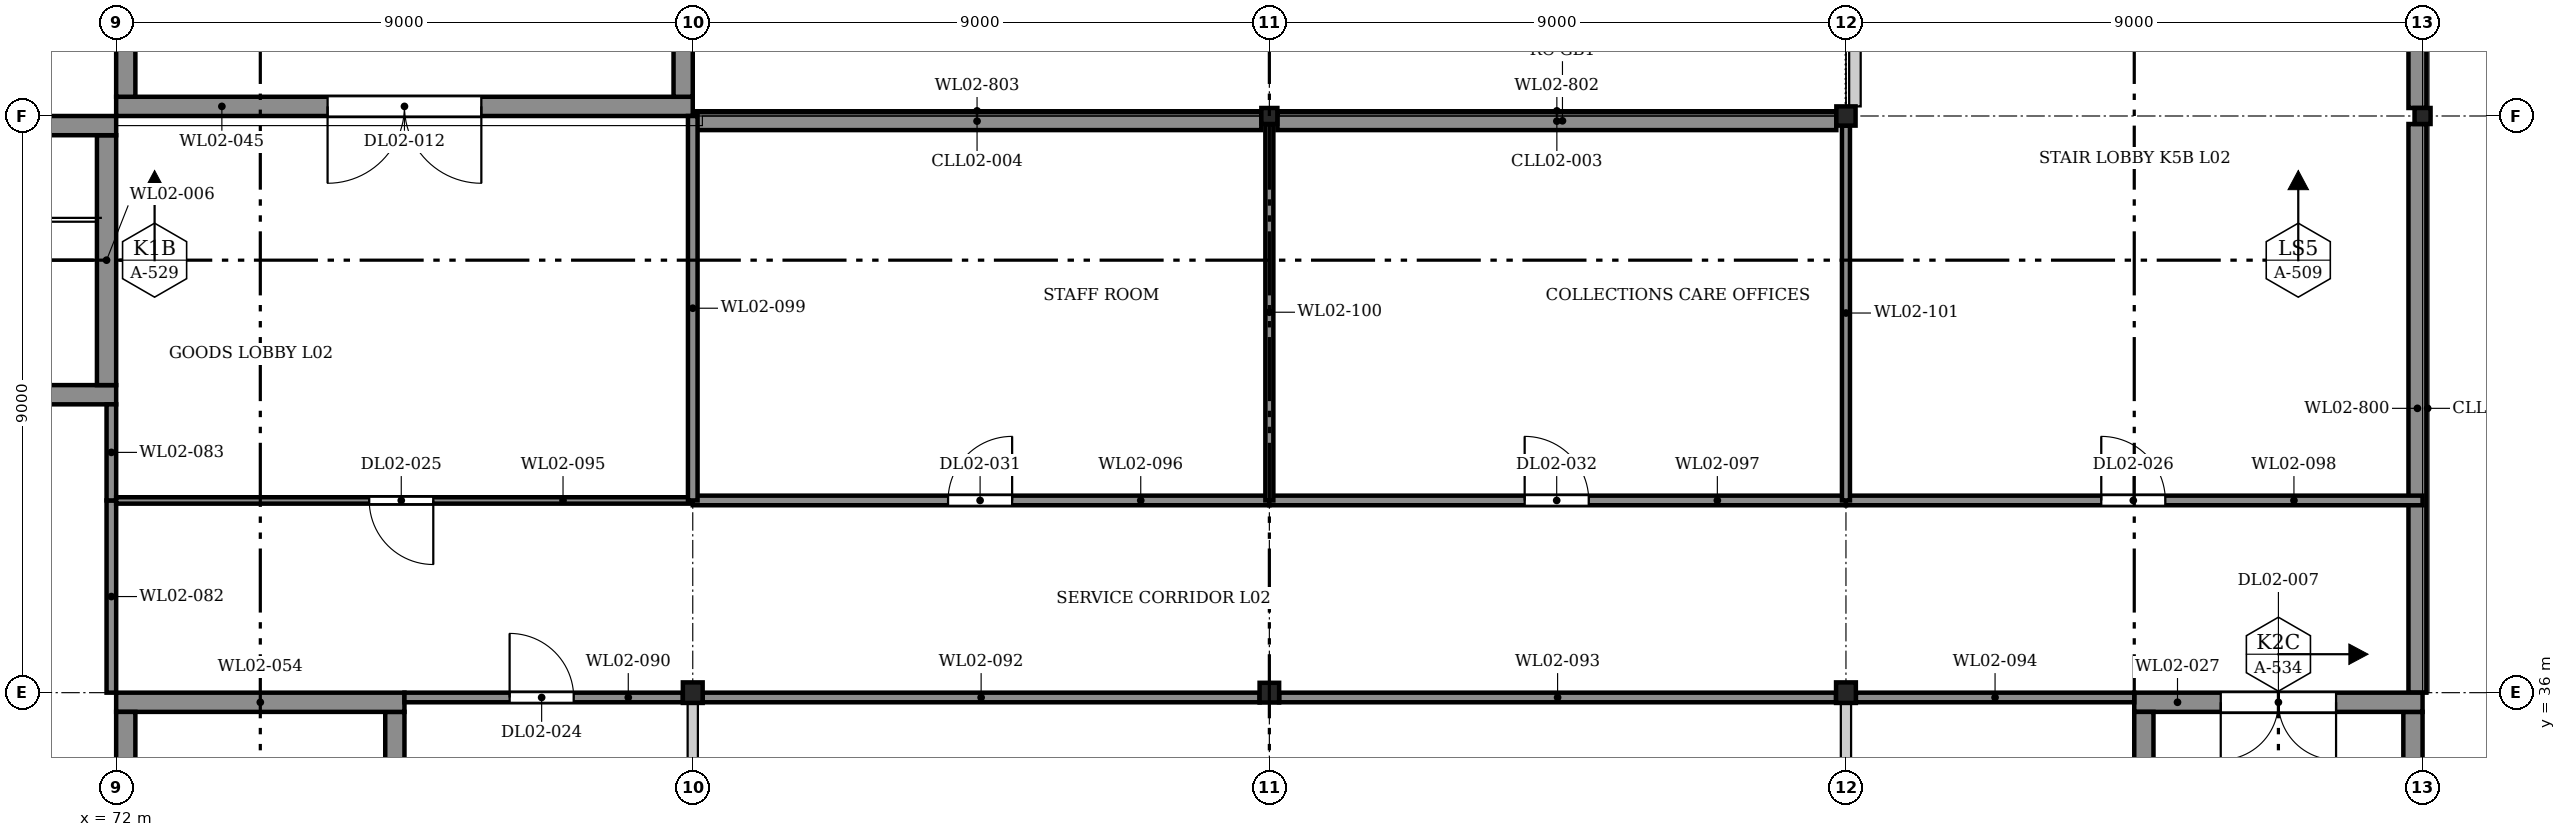
"""IFC4 building model, lengths in metres.
Left out: names, types, materials, properties, quantities, classifications, styles, units other than length and angle.
Written with IfcOpenShell. Run it as: python <this file> out.ifc"""

import sys

from ifc_helpers import new_model, si_unit, direction, frame, frame_2d, origin, origin_2d, place, context, subcontext, project, spatial, rectangle, hollow_rectangle, i_section, extrude, element, fill, save


model = new_model("IFC4")
c1 = context("Model", 3, precision=1e-05, world=origin(), true_north=direction((0.0, 1.0)))
c2 = subcontext(c1, "Body", "Model", "MODEL_VIEW")
j1 = project(units=[si_unit("LENGTHUNIT", "METRE"), si_unit("PLANEANGLEUNIT", "RADIAN")], contexts=[c1])
p1 = place(None, origin())
s1 = spatial("IfcSite", under=j1, at=p1, CompositionType="ELEMENT")
p2 = place(p1, origin())
s2 = spatial("IfcBuilding", under=s1, at=p2, CompositionType="ELEMENT")
p3 = place(p2, frame((0.0, 0.0, 9.2)))
s3 = spatial("IfcBuildingStorey", under=s2, at=p3, CompositionType="ELEMENT", Elevation=9.2)
p4 = place(p3, frame((81.0, 36.0, 0.0), z_axis=(0.0, 0.0, 1.0), x_axis=(1.0, 0.0, 0.0)))
e1 = element("IfcColumn", 1, at=p4, inside=s3, PredefinedType="COLUMN", context=c2, shape_type="SweptSolid", body=[
    extrude(i_section(OverallWidth=0.309, OverallDepth=0.321, WebThickness=0.014, FlangeThickness=0.022, FilletRadius=0.017, at=origin_2d()), origin(), (0.0, 0.0, 1.0), 4.2),
])
p5 = place(p3, frame((90.0, 36.0, 0.0), z_axis=(0.0, 0.0, 1.0), x_axis=(1.0, 0.0, 0.0)))
e2 = element("IfcColumn", 2, at=p5, inside=s3, PredefinedType="COLUMN", context=c2, shape_type="SweptSolid", body=[
    extrude(i_section(OverallWidth=0.305, OverallDepth=0.308, WebThickness=0.01, FlangeThickness=0.015, FilletRadius=0.017, at=origin_2d()), origin(), (0.0, 0.0, 1.0), 4.2),
])
p6 = place(p3, frame((99.0, 36.0, 0.0), z_axis=(0.0, 0.0, 1.0), x_axis=(1.0, 0.0, 0.0)))
e3 = element("IfcColumn", 3, at=p6, inside=s3, PredefinedType="COLUMN", context=c2, shape_type="SweptSolid", body=[
    extrude(i_section(OverallWidth=0.309, OverallDepth=0.321, WebThickness=0.014, FlangeThickness=0.022, FilletRadius=0.017, at=origin_2d()), origin(), (0.0, 0.0, 1.0), 4.2),
])
p7 = place(p3, frame((90.0, 45.0, 0.0), z_axis=(0.0, 0.0, 1.0), x_axis=(1.0, 0.0, 0.0)))
e4 = element("IfcColumn", 4, at=p7, inside=s3, PredefinedType="COLUMN", context=c2, shape_type="SweptSolid", body=[
    extrude(hollow_rectangle(XDim=0.25, YDim=0.25, WallThickness=0.01, InnerFilletRadius=0.015, OuterFilletRadius=0.025, at=origin_2d()), origin(), (0.0, 0.0, 1.0), 3.7),
])
p8 = place(p3, frame((99.0, 45.0, 0.0), z_axis=(0.0, 0.0, 1.0), x_axis=(1.0, 0.0, 0.0)))
e5 = element("IfcColumn", 5, at=p8, inside=s3, PredefinedType="COLUMN", context=c2, shape_type="SweptSolid", body=[
    extrude(hollow_rectangle(XDim=0.3, YDim=0.3, WallThickness=0.01, InnerFilletRadius=0.015, OuterFilletRadius=0.025, at=origin_2d()), origin(), (0.0, 0.0, 1.0), 3.7),
])
p9 = place(p3, frame((108.0, 45.0, 0.0), z_axis=(0.0, 0.0, 1.0), x_axis=(1.0, 0.0, 0.0)))
e6 = element("IfcColumn", 6, at=p9, inside=s3, PredefinedType="COLUMN", context=c2, shape_type="SweptSolid", body=[
    extrude(hollow_rectangle(XDim=0.25, YDim=0.25, WallThickness=0.01, InnerFilletRadius=0.015, OuterFilletRadius=0.025, at=origin_2d()), origin(), (0.0, 0.0, 1.0), 3.7),
])
for number, where, z_axis, x_axis in (
    (7, (107.92, 36.0, 0.0), (0.0, 0.0, 1.0), (0.0, 1.0, 0.0)),
    (8, (107.92, 45.125, 0.0), (0.0, 0.0, 1.0), (0.0, 1.0, 0.0)),
):
    element("IfcWall", number, at=place(p3, frame(where, z_axis=z_axis, x_axis=x_axis)), inside=s3, PredefinedType="SOLIDWALL", context=c2, shape_type="SweptSolid", body=[
        extrude(rectangle(XDim=8.875, YDim=0.28, at=frame_2d((4.438, 0.0))), origin(), (0.0, 0.0, 1.0), 2.75),
    ])
p10 = place(p3, frame((90.125, 44.92, 0.0), z_axis=(0.0, 0.0, 1.0), x_axis=(1.0, 0.0, 0.0)))
e9 = element("IfcWall", 9, at=p10, inside=s3, PredefinedType="SOLIDWALL", context=c2, shape_type="SweptSolid", body=[
    extrude(rectangle(XDim=8.725, YDim=0.28, at=frame_2d((4.363, 0.0))), origin(), (0.0, 0.0, 1.0), 2.75),
])
p11 = place(p3, frame((81.0, 44.92, 0.0), z_axis=(0.0, 0.0, 1.0), x_axis=(1.0, 0.0, 0.0)))
e10 = element("IfcWall", 10, at=p11, inside=s3, PredefinedType="SOLIDWALL", context=c2, shape_type="SweptSolid", body=[
    extrude(rectangle(XDim=8.875, YDim=0.28, at=frame_2d((4.438, 0.0))), origin(), (0.0, 0.0, 1.0), 2.75),
])
p12 = place(p3, frame((81.3, 44.875, 3.7), z_axis=(0.0, 0.0, 1.0), x_axis=(1.0, 0.0, 0.0)))
e11 = element("IfcWall", 11, at=p12, inside=s3, PredefinedType="PARAPET", context=c2, shape_type="SweptSolid", body=[
    extrude(rectangle(XDim=17.7, YDim=0.25, at=frame_2d((8.85, 0.0))), origin(), (0.0, 0.0, 1.0), 1.6),
])
for number, where, z_axis, x_axis in (
    (12, (99.125, 45.125, 3.7), (0.0, 0.0, 1.0), (0.0, 1.0, 0.0)),
    (13, (107.875, 45.125, 3.7), (0.0, 0.0, 1.0), (0.0, 1.0, 0.0)),
    (14, (107.875, 36.3, 3.7), (0.0, 0.0, 1.0), (0.0, 1.0, 0.0)),
):
    element("IfcWall", number, at=place(p3, frame(where, z_axis=z_axis, x_axis=x_axis)), inside=s3, PredefinedType="PARAPET", context=c2, shape_type="SweptSolid", body=[
        extrude(rectangle(XDim=8.575, YDim=0.25, at=frame_2d((4.288, 0.0))), origin(), (0.0, 0.0, 1.0), 1.6),
    ])
p13 = place(p3, frame((63.0, 40.65, 0.0), z_axis=(0.0, 0.0, 1.0), x_axis=(1.0, 0.0, 0.0)))
e15 = element("IfcWall", 15, at=p13, inside=s3, PredefinedType="SOLIDWALL", context=c2, shape_type="SweptSolid", body=[
    extrude(rectangle(XDim=9.0, YDim=0.3, at=frame_2d((4.5, 0.0))), origin(), (0.0, 0.0, 1.0), 4.2),
])
p14 = place(p3, frame((71.85, 40.8, 0.0), z_axis=(0.0, 0.0, 1.0), x_axis=(0.0, 1.0, 0.0)))
e16 = element("IfcWall", 16, at=p14, inside=s3, PredefinedType="SOLIDWALL", context=c2, shape_type="SweptSolid", body=[
    extrude(rectangle(XDim=3.9, YDim=0.3, at=frame_2d((1.95, 0.0))), origin(), (0.0, 0.0, 1.0), 4.2),
])
p15 = place(p3, frame((63.0, 44.85, 0.0), z_axis=(0.0, 0.0, 1.0), x_axis=(1.0, 0.0, 0.0)))
e17 = element("IfcWall", 17, at=p15, inside=s3, PredefinedType="SOLIDWALL", context=c2, shape_type="SweptSolid", body=[
    extrude(rectangle(XDim=9.0, YDim=0.3, at=frame_2d((4.5, 0.0))), origin(), (0.0, 0.0, 1.0), 4.2),
])
p16 = place(p3, frame((107.85, 27.3, 0.0), z_axis=(0.0, 0.0, 1.0), x_axis=(0.0, 1.0, 0.0)))
e18 = element("IfcWall", 18, at=p16, inside=s3, PredefinedType="SOLIDWALL", context=c2, shape_type="SweptSolid", body=[
    extrude(rectangle(XDim=8.4, YDim=0.3, at=frame_2d((4.2, 0.0))), origin(), (0.0, 0.0, 1.0), 4.2),
])
p17 = place(p3, frame((103.5, 35.85, 0.0), z_axis=(0.0, 0.0, 1.0), x_axis=(1.0, 0.0, 0.0)))
e19 = element("IfcWall", 19, at=p17, inside=s3, PredefinedType="SOLIDWALL", context=c2, shape_type="SweptSolid", body=[
    extrude(rectangle(XDim=4.5, YDim=0.3, at=frame_2d((2.25, 0.0))), origin(), (0.0, 0.0, 1.0), 4.2),
])
p18 = place(p17, frame((1.35, 0.0, 0.0)))
e20 = element("IfcOpeningElement", 20, at=p18, cuts=e19, PredefinedType="OPENING", context=c2, shape_type="SweptSolid", body=[
    extrude(rectangle(XDim=1.8, YDim=2.1, at=frame_2d((0.9, 1.05))), frame((0.0, 0.16, 0.0), z_axis=(0.0, -1.0, 0.0), x_axis=(1.0, 0.0, 0.0)), (0.0, 0.0, 1.0), 0.32),
])
p19 = place(p3, frame((103.65, 27.3, 0.0), z_axis=(0.0, 0.0, 1.0), x_axis=(0.0, 1.0, 0.0)))
e21 = element("IfcWall", 21, at=p19, inside=s3, PredefinedType="SOLIDWALL", context=c2, shape_type="SweptSolid", body=[
    extrude(rectangle(XDim=8.4, YDim=0.3, at=frame_2d((4.2, 0.0))), origin(), (0.0, 0.0, 1.0), 4.2),
])
p20 = place(p3, frame((72.0, 45.15, 0.0), z_axis=(0.0, 0.0, 1.0), x_axis=(1.0, 0.0, 0.0)))
e22 = element("IfcWall", 22, at=p20, inside=s3, PredefinedType="SOLIDWALL", context=c2, shape_type="SweptSolid", body=[
    extrude(rectangle(XDim=9.0, YDim=0.3, at=frame_2d((4.5, 0.0))), origin(), (0.0, 0.0, 1.0), 4.2),
])
p21 = place(p20, frame((3.3, 0.0, 0.0)))
e23 = element("IfcOpeningElement", 23, at=p21, cuts=e22, PredefinedType="OPENING", context=c2, shape_type="SweptSolid", body=[
    extrude(rectangle(XDim=2.4, YDim=2.4, at=frame_2d((1.2, 1.2))), frame((0.0, 0.16, 0.0), z_axis=(0.0, -1.0, 0.0), x_axis=(1.0, 0.0, 0.0)), (0.0, 0.0, 1.0), 0.32),
])
for number, where, z_axis, x_axis in (
    (24, (80.85, 45.3, 0.0), (0.0, 0.0, 1.0), (0.0, 1.0, 0.0)),
    (25, (72.15, 45.3, 0.0), (0.0, 0.0, 1.0), (0.0, 1.0, 0.0)),
):
    element("IfcWall", number, at=place(p3, frame(where, z_axis=z_axis, x_axis=x_axis)), inside=s3, PredefinedType="SOLIDWALL", context=c2, shape_type="SweptSolid", body=[
        extrude(rectangle(XDim=8.4, YDim=0.3, at=frame_2d((4.2, 0.0))), origin(), (0.0, 0.0, 1.0), 4.2),
    ])
p22 = place(p3, frame((76.35, 27.3, 0.0), z_axis=(0.0, 0.0, 1.0), x_axis=(0.0, 1.0, 0.0)))
e26 = element("IfcWall", 26, at=p22, inside=s3, PredefinedType="SOLIDWALL", context=c2, shape_type="SweptSolid", body=[
    extrude(rectangle(XDim=8.4, YDim=0.3, at=frame_2d((4.2, 0.0))), origin(), (0.0, 0.0, 1.0), 4.2),
])
p23 = place(p22, frame((0.45, 0.0, 0.0)))
e27 = element("IfcOpeningElement", 27, at=p23, cuts=e26, PredefinedType="OPENING", context=c2, shape_type="SweptSolid", body=[
    extrude(rectangle(XDim=1.4, YDim=2.1, at=frame_2d((0.7, 1.05))), frame((0.0, 0.16, 0.0), z_axis=(0.0, -1.0, 0.0), x_axis=(1.0, 0.0, 0.0)), (0.0, 0.0, 1.0), 0.32),
])
p24 = place(p22, frame((4.925, 0.0, 0.0)))
e28 = element("IfcOpeningElement", 28, at=p24, cuts=e26, PredefinedType="OPENING", context=c2, shape_type="SweptSolid", body=[
    extrude(rectangle(XDim=1.0, YDim=2.1, at=frame_2d((0.5, 1.05))), frame((0.0, 0.16, 0.0), z_axis=(0.0, -1.0, 0.0), x_axis=(1.0, 0.0, 0.0)), (0.0, 0.0, 1.0), 0.32),
])
p25 = place(p3, frame((72.0, 35.85, 0.0), z_axis=(0.0, 0.0, 1.0), x_axis=(1.0, 0.0, 0.0)))
e29 = element("IfcWall", 29, at=p25, inside=s3, PredefinedType="SOLIDWALL", context=c2, shape_type="SweptSolid", body=[
    extrude(rectangle(XDim=4.5, YDim=0.3, at=frame_2d((2.25, 0.0))), origin(), (0.0, 0.0, 1.0), 4.2),
])
p26 = place(p3, frame((72.15, 27.3, 0.0), z_axis=(0.0, 0.0, 1.0), x_axis=(0.0, 1.0, 0.0)))
e30 = element("IfcWall", 30, at=p26, inside=s3, PredefinedType="SOLIDWALL", context=c2, shape_type="SweptSolid", body=[
    extrude(rectangle(XDim=8.4, YDim=0.3, at=frame_2d((4.2, 0.0))), origin(), (0.0, 0.0, 1.0), 4.2),
])
p27 = place(p26, frame((0.45, 0.0, 0.0)))
e31 = element("IfcOpeningElement", 31, at=p27, cuts=e30, PredefinedType="OPENING", context=c2, shape_type="SweptSolid", body=[
    extrude(rectangle(XDim=1.4, YDim=2.1, at=frame_2d((0.7, 1.05))), frame((0.0, 0.16, 0.0), z_axis=(0.0, -1.0, 0.0), x_axis=(1.0, 0.0, 0.0)), (0.0, 0.0, 1.0), 0.32),
])
p28 = place(p3, frame((71.925, 36.0, 0.0), z_axis=(0.0, 0.0, 1.0), x_axis=(0.0, 1.0, 0.0)))
e32 = element("IfcWall", 32, at=p28, inside=s3, PredefinedType="PARTITIONING", context=c2, shape_type="SweptSolid", body=[
    extrude(rectangle(XDim=3.0, YDim=0.15, at=frame_2d((1.5, 0.0))), origin(), (0.0, 0.0, 1.0), 3.035),
])
p29 = place(p3, frame((71.925, 39.0, 0.0), z_axis=(0.0, 0.0, 1.0), x_axis=(0.0, 1.0, 0.0)))
e33 = element("IfcWall", 33, at=p29, inside=s3, PredefinedType="PARTITIONING", context=c2, shape_type="SweptSolid", body=[
    extrude(rectangle(XDim=1.5, YDim=0.15, at=frame_2d((0.75, 0.0))), origin(), (0.0, 0.0, 1.0), 3.035),
])
p30 = place(p3, frame((76.5, 35.925, 0.0), z_axis=(0.0, 0.0, 1.0), x_axis=(1.0, 0.0, 0.0)))
e34 = element("IfcWall", 34, at=p30, inside=s3, PredefinedType="PARTITIONING", context=c2, shape_type="SweptSolid", body=[
    extrude(rectangle(XDim=4.345, YDim=0.15, at=frame_2d((2.173, 0.0))), origin(), (0.0, 0.0, 1.0), 3.035),
])
p31 = place(p30, frame((1.641, 0.0, 0.0)))
e35 = element("IfcOpeningElement", 35, at=p31, cuts=e34, PredefinedType="OPENING", context=c2, shape_type="SweptSolid", body=[
    extrude(rectangle(XDim=1.0, YDim=2.1, at=frame_2d((0.5, 1.05))), frame((0.0, 0.085, 0.0), z_axis=(0.0, -1.0, 0.0), x_axis=(1.0, 0.0, 0.0)), (0.0, 0.0, 1.0), 0.17),
])
for number, where, z_axis, x_axis in (
    (36, (81.155, 35.925, 0.0), (0.0, 0.0, 1.0), (1.0, 0.0, 0.0)),
    (37, (90.153, 35.925, 0.0), (0.0, 0.0, 1.0), (1.0, 0.0, 0.0)),
):
    element("IfcWall", number, at=place(p3, frame(where, z_axis=z_axis, x_axis=x_axis)), inside=s3, PredefinedType="PARTITIONING", context=c2, shape_type="SweptSolid", body=[
        extrude(rectangle(XDim=8.693, YDim=0.15, at=frame_2d((4.346, 0.0))), origin(), (0.0, 0.0, 1.0), 3.035),
    ])
p32 = place(p3, frame((99.155, 35.925, 0.0), z_axis=(0.0, 0.0, 1.0), x_axis=(1.0, 0.0, 0.0)))
e38 = element("IfcWall", 38, at=p32, inside=s3, PredefinedType="PARTITIONING", context=c2, shape_type="SweptSolid", body=[
    extrude(rectangle(XDim=4.345, YDim=0.15, at=frame_2d((2.173, 0.0))), origin(), (0.0, 0.0, 1.0), 3.035),
])
p33 = place(p3, frame((72.0, 39.0, 0.0), z_axis=(0.0, 0.0, 1.0), x_axis=(1.0, 0.0, 0.0)))
e39 = element("IfcWall", 39, at=p33, inside=s3, PredefinedType="PARTITIONING", context=c2, shape_type="SweptSolid", body=[
    extrude(rectangle(XDim=9.0, YDim=0.1, at=frame_2d((4.5, 0.0))), origin(), (0.0, 0.0, 1.0), 2.658),
])
p34 = place(p33, frame((3.95, 0.0, 0.0)))
e40 = element("IfcOpeningElement", 40, at=p34, cuts=e39, PredefinedType="OPENING", context=c2, shape_type="SweptSolid", body=[
    extrude(rectangle(XDim=1.0, YDim=2.1, at=frame_2d((0.5, 1.05))), frame((0.0, 0.06, 0.0), z_axis=(0.0, -1.0, 0.0), x_axis=(1.0, 0.0, 0.0)), (0.0, 0.0, 1.0), 0.12),
])
p35 = place(p3, frame((81.0, 39.0, 0.0), z_axis=(0.0, 0.0, 1.0), x_axis=(1.0, 0.0, 0.0)))
e41 = element("IfcWall", 41, at=p35, inside=s3, PredefinedType="PARTITIONING", context=c2, shape_type="SweptSolid", body=[
    extrude(rectangle(XDim=9.0, YDim=0.15, at=frame_2d((4.5, 0.0))), origin(), (0.0, 0.0, 1.0), 2.658),
])
p36 = place(p35, frame((3.985, 0.0, 0.0)))
e42 = element("IfcOpeningElement", 42, at=p36, cuts=e41, PredefinedType="OPENING", context=c2, shape_type="SweptSolid", body=[
    extrude(rectangle(XDim=1.0, YDim=2.1, at=frame_2d((0.5, 1.05))), frame((0.0, 0.085, 0.0), z_axis=(0.0, -1.0, 0.0), x_axis=(1.0, 0.0, 0.0)), (0.0, 0.0, 1.0), 0.17),
])
p37 = place(p3, frame((90.0, 39.0, 0.0), z_axis=(0.0, 0.0, 1.0), x_axis=(1.0, 0.0, 0.0)))
e43 = element("IfcWall", 43, at=p37, inside=s3, PredefinedType="PARTITIONING", context=c2, shape_type="SweptSolid", body=[
    extrude(rectangle(XDim=9.0, YDim=0.15, at=frame_2d((4.5, 0.0))), origin(), (0.0, 0.0, 1.0), 2.658),
])
p38 = place(p37, frame((3.985, 0.0, 0.0)))
e44 = element("IfcOpeningElement", 44, at=p38, cuts=e43, PredefinedType="OPENING", context=c2, shape_type="SweptSolid", body=[
    extrude(rectangle(XDim=1.0, YDim=2.1, at=frame_2d((0.5, 1.05))), frame((0.0, 0.085, 0.0), z_axis=(0.0, -1.0, 0.0), x_axis=(1.0, 0.0, 0.0)), (0.0, 0.0, 1.0), 0.17),
])
p39 = place(p3, frame((99.0, 39.0, 0.0), z_axis=(0.0, 0.0, 1.0), x_axis=(1.0, 0.0, 0.0)))
e45 = element("IfcWall", 45, at=p39, inside=s3, PredefinedType="PARTITIONING", context=c2, shape_type="SweptSolid", body=[
    extrude(rectangle(XDim=9.0, YDim=0.15, at=frame_2d((4.5, 0.0))), origin(), (0.0, 0.0, 1.0), 2.658),
])
p40 = place(p39, frame((3.985, 0.0, 0.0)))
e46 = element("IfcOpeningElement", 46, at=p40, cuts=e45, PredefinedType="OPENING", context=c2, shape_type="SweptSolid", body=[
    extrude(rectangle(XDim=1.0, YDim=2.1, at=frame_2d((0.5, 1.05))), frame((0.0, 0.085, 0.0), z_axis=(0.0, -1.0, 0.0), x_axis=(1.0, 0.0, 0.0)), (0.0, 0.0, 1.0), 0.17),
])
p41 = place(p3, frame((81.0, 39.0, 0.0), z_axis=(0.0, 0.0, 1.0), x_axis=(0.0, 1.0, 0.0)))
e47 = element("IfcWall", 47, at=p41, inside=s3, PredefinedType="PARTITIONING", context=c2, shape_type="SweptSolid", body=[
    extrude(rectangle(XDim=6.0, YDim=0.15, at=frame_2d((3.0, 0.0))), origin(), (0.0, 0.0, 1.0), 2.658),
])
p42 = place(p3, frame((90.0, 39.0, 0.0), z_axis=(0.0, 0.0, 1.0), x_axis=(0.0, 1.0, 0.0)))
e48 = element("IfcWall", 48, at=p42, inside=s3, PredefinedType="PARTITIONING", context=c2, shape_type="SweptSolid", body=[
    extrude(rectangle(XDim=5.875, YDim=0.125, at=frame_2d((2.938, 0.0))), origin(), (0.0, 0.0, 1.0), 2.658),
])
p43 = place(p3, frame((99.0, 39.0, 0.0), z_axis=(0.0, 0.0, 1.0), x_axis=(0.0, 1.0, 0.0)))
e49 = element("IfcWall", 49, at=p43, inside=s3, PredefinedType="PARTITIONING", context=c2, shape_type="SweptSolid", body=[
    extrude(rectangle(XDim=5.85, YDim=0.125, at=frame_2d((2.925, 0.0))), origin(), (0.0, 0.0, 1.0), 2.658),
])
p44 = place(p18, frame((1.8, 0.0, 0.0), z_axis=(0.0, 0.0, 1.0), x_axis=(-1.0, 0.0, 0.0)))
e50 = element("IfcDoor", 50, at=p44, inside=s3, OperationType="DOUBLE_DOOR_SINGLE_SWING", PredefinedType="DOOR", context=c2, shape_type="SweptSolid", body=[
    extrude(rectangle(XDim=1.8, YDim=2.1, at=frame_2d((0.9, 1.05))), frame((0.0, 0.025, 0.0), z_axis=(0.0, -1.0, 0.0), x_axis=(1.0, 0.0, 0.0)), (0.0, 0.0, 1.0), 0.05),
])
fill(e20, e50)
p45 = place(p21, frame((2.4, 0.0, 0.0), z_axis=(0.0, 0.0, 1.0), x_axis=(-1.0, 0.0, 0.0)))
e51 = element("IfcDoor", 51, at=p45, inside=s3, OperationType="DOUBLE_DOOR_SINGLE_SWING", PredefinedType="DOOR", context=c2, shape_type="SweptSolid", body=[
    extrude(rectangle(XDim=2.4, YDim=2.4, at=frame_2d((1.2, 1.2))), frame((0.0, 0.025, 0.0), z_axis=(0.0, -1.0, 0.0), x_axis=(1.0, 0.0, 0.0)), (0.0, 0.0, 1.0), 0.05),
])
fill(e23, e51)
p46 = place(p31, origin())
e52 = element("IfcDoor", 52, at=p46, inside=s3, OperationType="SINGLE_SWING_RIGHT", PredefinedType="DOOR", context=c2, shape_type="SweptSolid", body=[
    extrude(rectangle(XDim=1.0, YDim=2.1, at=frame_2d((0.5, 1.05))), frame((0.0, 0.025, 0.0), z_axis=(0.0, -1.0, 0.0), x_axis=(1.0, 0.0, 0.0)), (0.0, 0.0, 1.0), 0.05),
])
fill(e35, e52)
p47 = place(p34, frame((1.0, 0.0, 0.0), z_axis=(0.0, 0.0, 1.0), x_axis=(-1.0, 0.0, 0.0)))
e53 = element("IfcDoor", 53, at=p47, inside=s3, OperationType="SINGLE_SWING_RIGHT", PredefinedType="DOOR", context=c2, shape_type="SweptSolid", body=[
    extrude(rectangle(XDim=1.0, YDim=2.1, at=frame_2d((0.5, 1.05))), frame((0.0, 0.025, 0.0), z_axis=(0.0, -1.0, 0.0), x_axis=(1.0, 0.0, 0.0)), (0.0, 0.0, 1.0), 0.05),
])
fill(e40, e53)
p48 = place(p40, origin())
e54 = element("IfcDoor", 54, at=p48, inside=s3, OperationType="SINGLE_SWING_RIGHT", PredefinedType="DOOR", context=c2, shape_type="SweptSolid", body=[
    extrude(rectangle(XDim=1.0, YDim=2.1, at=frame_2d((0.5, 1.05))), frame((0.0, 0.025, 0.0), z_axis=(0.0, -1.0, 0.0), x_axis=(1.0, 0.0, 0.0)), (0.0, 0.0, 1.0), 0.05),
])
fill(e46, e54)
p49 = place(p36, origin())
e55 = element("IfcDoor", 55, at=p49, inside=s3, OperationType="SINGLE_SWING_LEFT", PredefinedType="DOOR", context=c2, shape_type="SweptSolid", body=[
    extrude(rectangle(XDim=1.0, YDim=2.1, at=frame_2d((0.5, 1.05))), frame((0.0, 0.025, 0.0), z_axis=(0.0, -1.0, 0.0), x_axis=(1.0, 0.0, 0.0)), (0.0, 0.0, 1.0), 0.05),
])
fill(e42, e55)
p50 = place(p38, origin())
e56 = element("IfcDoor", 56, at=p50, inside=s3, OperationType="SINGLE_SWING_RIGHT", PredefinedType="DOOR", context=c2, shape_type="SweptSolid", body=[
    extrude(rectangle(XDim=1.0, YDim=2.1, at=frame_2d((0.5, 1.05))), frame((0.0, 0.025, 0.0), z_axis=(0.0, -1.0, 0.0), x_axis=(1.0, 0.0, 0.0)), (0.0, 0.0, 1.0), 0.05),
])
fill(e44, e56)
save(model, sys.argv[1])
